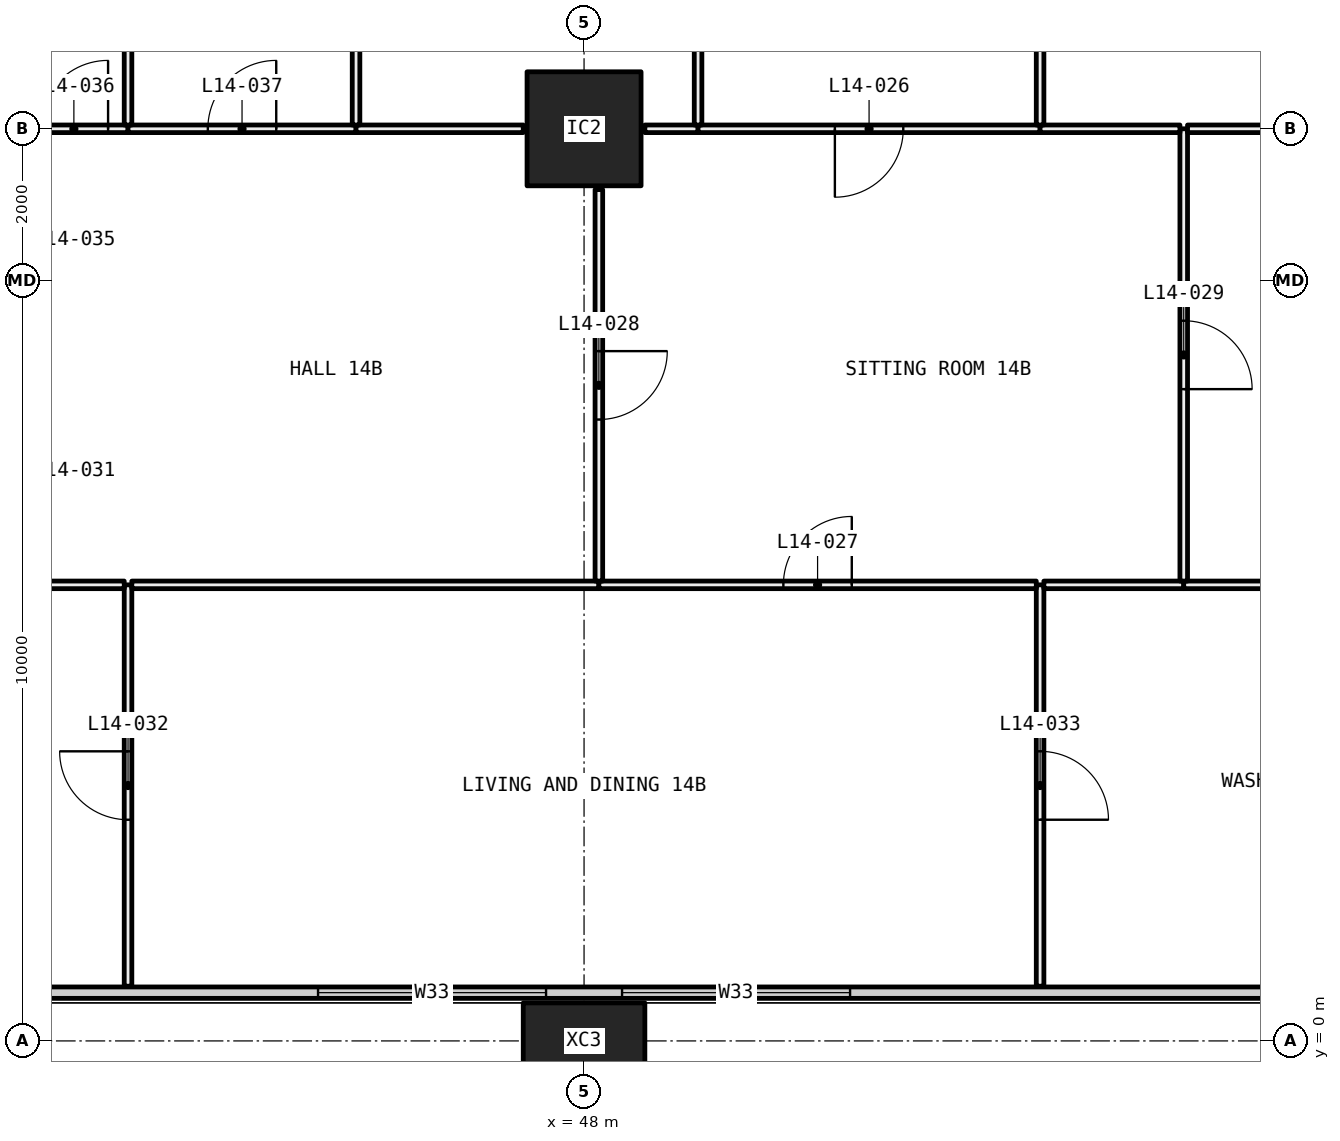
"""IFC4 building model, lengths in metres.
Left out: names, types, materials, properties, quantities, classifications, styles, units other than length and angle.
Written with IfcOpenShell. Run it as: python <this file> out.ifc"""

import sys

from ifc_helpers import new_model, si_unit, direction, frame, frame_2d, origin, origin_2d, place, context, subcontext, project, spatial, rectangle, hollow_rectangle, extrude, element, fill, save


model = new_model("IFC4")
c1 = context("Model", 3, precision=1e-05, world=origin(), true_north=direction((0.0, 1.0)))
c2 = subcontext(c1, "Body", "Model", "MODEL_VIEW")
j1 = project(units=[si_unit("LENGTHUNIT", "METRE"), si_unit("PLANEANGLEUNIT", "RADIAN")], contexts=[c1])
p1 = place(None, origin())
s1 = spatial("IfcSite", under=j1, at=p1, CompositionType="ELEMENT")
p2 = place(p1, origin())
s2 = spatial("IfcBuilding", under=s1, at=p2, CompositionType="ELEMENT")
p3 = place(p2, frame((0.0, 0.0, 61.05)))
s3 = spatial("IfcBuildingStorey", under=s2, at=p3, CompositionType="ELEMENT", Elevation=61.05)
p4 = place(p3, frame((48.0, 0.0, -0.4), z_axis=(0.0, 0.0, 1.0), x_axis=(1.0, 0.0, 0.0)))
e1 = element("IfcColumn", 1, at=p4, inside=s3, PredefinedType="COLUMN", context=c2, shape_type="SweptSolid", body=[
    extrude(hollow_rectangle(XDim=1.6, YDim=1.0, WallThickness=0.065, at=origin_2d()), origin(), (0.0, 0.0, 1.0), 3.45),
])
p5 = place(p3, frame((48.0, 12.0, 0.0), z_axis=(0.0, 0.0, 1.0), x_axis=(1.0, 0.0, 0.0)))
e2 = element("IfcColumn", 2, at=p5, inside=s3, PredefinedType="COLUMN", context=c2, shape_type="SweptSolid", body=[
    extrude(hollow_rectangle(XDim=1.5, YDim=1.5, WallThickness=0.065, at=origin_2d()), origin(), (0.0, 0.0, 1.0), 3.05),
])
p6 = place(p3, frame((6.56, 0.635, 0.0), z_axis=(0.0, 0.0, 1.0), x_axis=(1.0, 0.0, 0.0)))
e3 = element("IfcWall", 3, at=p6, inside=s3, PredefinedType="ELEMENTEDWALL", context=c2, shape_type="SweptSolid", body=[
    extrude(rectangle(XDim=58.88, YDim=0.15, at=frame_2d((29.44, 0.0))), origin(), (0.0, 0.0, 1.0), 3.05),
])
p7 = place(p6, frame((0.44, 0.0, 0.45)))
e4 = element("IfcOpeningElement", 4, at=p7, cuts=e3, PredefinedType="OPENING", context=c2, shape_type="SweptSolid", body=[
    extrude(rectangle(XDim=4.5, YDim=2.55, at=frame_2d((2.25, 1.275))), frame((0.0, 0.085, 0.0), z_axis=(0.0, -1.0, 0.0), x_axis=(1.0, 0.0, 0.0)), (0.0, 0.0, 1.0), 0.17),
])
p8 = place(p6, frame((5.94, 0.0, 0.45)))
e5 = element("IfcOpeningElement", 5, at=p8, cuts=e3, PredefinedType="OPENING", context=c2, shape_type="SweptSolid", body=[
    extrude(rectangle(XDim=3.0, YDim=2.55, at=frame_2d((1.5, 1.275))), frame((0.0, 0.085, 0.0), z_axis=(0.0, -1.0, 0.0), x_axis=(1.0, 0.0, 0.0)), (0.0, 0.0, 1.0), 0.17),
])
p9 = place(p6, frame((13.94, 0.0, 0.45)))
e6 = element("IfcOpeningElement", 6, at=p9, cuts=e3, PredefinedType="OPENING", context=c2, shape_type="SweptSolid", body=[
    extrude(rectangle(XDim=3.0, YDim=2.55, at=frame_2d((1.5, 1.275))), frame((0.0, 0.085, 0.0), z_axis=(0.0, -1.0, 0.0), x_axis=(1.0, 0.0, 0.0)), (0.0, 0.0, 1.0), 0.17),
])
p10 = place(p6, frame((17.94, 0.0, 0.45)))
e7 = element("IfcOpeningElement", 7, at=p10, cuts=e3, PredefinedType="OPENING", context=c2, shape_type="SweptSolid", body=[
    extrude(rectangle(XDim=3.0, YDim=2.55, at=frame_2d((1.5, 1.275))), frame((0.0, 0.085, 0.0), z_axis=(0.0, -1.0, 0.0), x_axis=(1.0, 0.0, 0.0)), (0.0, 0.0, 1.0), 0.17),
])
p11 = place(p6, frame((26.94, 0.0, 0.45)))
e8 = element("IfcOpeningElement", 8, at=p11, cuts=e3, PredefinedType="OPENING", context=c2, shape_type="SweptSolid", body=[
    extrude(rectangle(XDim=2.0, YDim=2.55, at=frame_2d((1.0, 1.275))), frame((0.0, 0.085, 0.0), z_axis=(0.0, -1.0, 0.0), x_axis=(1.0, 0.0, 0.0)), (0.0, 0.0, 1.0), 0.17),
])
p12 = place(p6, frame((29.94, 0.0, 0.45)))
e9 = element("IfcOpeningElement", 9, at=p12, cuts=e3, PredefinedType="OPENING", context=c2, shape_type="SweptSolid", body=[
    extrude(rectangle(XDim=3.0, YDim=2.55, at=frame_2d((1.5, 1.275))), frame((0.0, 0.085, 0.0), z_axis=(0.0, -1.0, 0.0), x_axis=(1.0, 0.0, 0.0)), (0.0, 0.0, 1.0), 0.17),
])
p13 = place(p6, frame((37.94, 0.0, 0.45)))
e10 = element("IfcOpeningElement", 10, at=p13, cuts=e3, PredefinedType="OPENING", context=c2, shape_type="SweptSolid", body=[
    extrude(rectangle(XDim=3.0, YDim=2.55, at=frame_2d((1.5, 1.275))), frame((0.0, 0.085, 0.0), z_axis=(0.0, -1.0, 0.0), x_axis=(1.0, 0.0, 0.0)), (0.0, 0.0, 1.0), 0.17),
])
p14 = place(p6, frame((41.94, 0.0, 0.45)))
e11 = element("IfcOpeningElement", 11, at=p14, cuts=e3, PredefinedType="OPENING", context=c2, shape_type="SweptSolid", body=[
    extrude(rectangle(XDim=3.0, YDim=2.55, at=frame_2d((1.5, 1.275))), frame((0.0, 0.085, 0.0), z_axis=(0.0, -1.0, 0.0), x_axis=(1.0, 0.0, 0.0)), (0.0, 0.0, 1.0), 0.17),
])
p15 = place(p6, frame((50.94, 0.0, 0.45)))
e12 = element("IfcOpeningElement", 12, at=p15, cuts=e3, PredefinedType="OPENING", context=c2, shape_type="SweptSolid", body=[
    extrude(rectangle(XDim=2.0, YDim=2.55, at=frame_2d((1.0, 1.275))), frame((0.0, 0.085, 0.0), z_axis=(0.0, -1.0, 0.0), x_axis=(1.0, 0.0, 0.0)), (0.0, 0.0, 1.0), 0.17),
])
p16 = place(p6, frame((53.94, 0.0, 0.45)))
e13 = element("IfcOpeningElement", 13, at=p16, cuts=e3, PredefinedType="OPENING", context=c2, shape_type="SweptSolid", body=[
    extrude(rectangle(XDim=4.5, YDim=2.55, at=frame_2d((2.25, 1.275))), frame((0.0, 0.085, 0.0), z_axis=(0.0, -1.0, 0.0), x_axis=(1.0, 0.0, 0.0)), (0.0, 0.0, 1.0), 0.17),
])
p17 = place(p3, frame((42.0, 0.72, 0.0), z_axis=(0.0, 0.0, 1.0), x_axis=(0.0, 1.0, 0.0)))
e14 = element("IfcWall", 14, at=p17, inside=s3, PredefinedType="PARTITIONING", context=c2, shape_type="SweptSolid", body=[
    extrude(rectangle(XDim=5.28, YDim=0.1, at=frame_2d((2.64, 0.0))), origin(), (0.0, 0.0, 1.0), 3.05),
])
p18 = place(p17, frame((2.19, 0.0, 0.0)))
e15 = element("IfcOpeningElement", 15, at=p18, cuts=e14, PredefinedType="OPENING", context=c2, shape_type="SweptSolid", body=[
    extrude(rectangle(XDim=0.9, YDim=2.1, at=frame_2d((0.45, 1.05))), frame((0.0, 0.06, 0.0), z_axis=(0.0, -1.0, 0.0), x_axis=(1.0, 0.0, 0.0)), (0.0, 0.0, 1.0), 0.12),
])
p19 = place(p3, frame((41.95, 6.0, 0.0), z_axis=(0.0, 0.0, 1.0), x_axis=(-1.0, 0.0, 0.0)))
e16 = element("IfcWall", 16, at=p19, inside=s3, PredefinedType="PARTITIONING", context=c2, shape_type="SweptSolid", body=[
    extrude(rectangle(XDim=1.375, YDim=0.1, at=frame_2d((0.688, 0.0))), origin(), (0.0, 0.0, 1.0), 3.05),
])
p20 = place(p3, frame((54.0, 0.72, 0.0), z_axis=(0.0, 0.0, 1.0), x_axis=(0.0, 1.0, 0.0)))
e17 = element("IfcWall", 17, at=p20, inside=s3, PredefinedType="PARTITIONING", context=c2, shape_type="SweptSolid", body=[
    extrude(rectangle(XDim=5.28, YDim=0.1, at=frame_2d((2.64, 0.0))), origin(), (0.0, 0.0, 1.0), 3.05),
])
p21 = place(p20, frame((2.19, 0.0, 0.0)))
e18 = element("IfcOpeningElement", 18, at=p21, cuts=e17, PredefinedType="OPENING", context=c2, shape_type="SweptSolid", body=[
    extrude(rectangle(XDim=0.9, YDim=2.1, at=frame_2d((0.45, 1.05))), frame((0.0, 0.06, 0.0), z_axis=(0.0, -1.0, 0.0), x_axis=(1.0, 0.0, 0.0)), (0.0, 0.0, 1.0), 0.12),
])
p22 = place(p3, frame((48.195, 6.0, 0.0), z_axis=(0.0, 0.0, 1.0), x_axis=(-1.0, 0.0, 0.0)))
e19 = element("IfcWall", 19, at=p22, inside=s3, PredefinedType="PARTITIONING", context=c2, shape_type="SweptSolid", body=[
    extrude(rectangle(XDim=6.145, YDim=0.1, at=frame_2d((3.073, 0.0))), origin(), (0.0, 0.0, 1.0), 2.45),
])
p23 = place(p3, frame((53.95, 6.0, 0.0), z_axis=(0.0, 0.0, 1.0), x_axis=(-1.0, 0.0, 0.0)))
e20 = element("IfcWall", 20, at=p23, inside=s3, PredefinedType="PARTITIONING", context=c2, shape_type="SweptSolid", body=[
    extrude(rectangle(XDim=5.755, YDim=0.1, at=frame_2d((2.877, 0.0))), origin(), (0.0, 0.0, 1.0), 3.05),
])
p24 = place(p23, frame((2.427, 0.0, 0.0)))
e21 = element("IfcOpeningElement", 21, at=p24, cuts=e20, PredefinedType="OPENING", context=c2, shape_type="SweptSolid", body=[
    extrude(rectangle(XDim=0.9, YDim=2.1, at=frame_2d((0.45, 1.05))), frame((0.0, 0.06, 0.0), z_axis=(0.0, -1.0, 0.0), x_axis=(1.0, 0.0, 0.0)), (0.0, 0.0, 1.0), 0.12),
])
p25 = place(p3, frame((55.89, 6.0, 0.0), z_axis=(0.0, 0.0, 1.0), x_axis=(-1.0, 0.0, 0.0)))
e22 = element("IfcWall", 22, at=p25, inside=s3, PredefinedType="PARTITIONING", context=c2, shape_type="SweptSolid", body=[
    extrude(rectangle(XDim=1.84, YDim=0.1, at=frame_2d((0.92, 0.0))), origin(), (0.0, 0.0, 1.0), 3.05),
])
p26 = place(p3, frame((59.95, 6.0, 0.0), z_axis=(0.0, 0.0, 1.0), x_axis=(-1.0, 0.0, 0.0)))
e23 = element("IfcWall", 23, at=p26, inside=s3, PredefinedType="PARTITIONING", context=c2, shape_type="SweptSolid", body=[
    extrude(rectangle(XDim=4.06, YDim=0.1, at=frame_2d((2.03, 0.0))), origin(), (0.0, 0.0, 1.0), 2.45),
])
p27 = place(p3, frame((48.195, 6.05, 0.0), z_axis=(0.0, 0.0, 1.0), x_axis=(0.0, 1.0, 0.0)))
e24 = element("IfcWall", 24, at=p27, inside=s3, PredefinedType="PARTITIONING", context=c2, shape_type="SweptSolid", body=[
    extrude(rectangle(XDim=5.15, YDim=0.1, at=frame_2d((2.575, 0.0))), origin(), (0.0, 0.0, 1.0), 3.05),
])
p28 = place(p27, frame((2.125, 0.0, 0.0)))
e25 = element("IfcOpeningElement", 25, at=p28, cuts=e24, PredefinedType="OPENING", context=c2, shape_type="SweptSolid", body=[
    extrude(rectangle(XDim=0.9, YDim=2.1, at=frame_2d((0.45, 1.05))), frame((0.0, 0.06, 0.0), z_axis=(0.0, -1.0, 0.0), x_axis=(1.0, 0.0, 0.0)), (0.0, 0.0, 1.0), 0.12),
])
p29 = place(p3, frame((42.0, 12.0, 0.0), z_axis=(0.0, 0.0, 1.0), x_axis=(-1.0, 0.0, 0.0)))
e26 = element("IfcWall", 26, at=p29, inside=s3, PredefinedType="PARTITIONING", context=c2, shape_type="SweptSolid", body=[
    extrude(rectangle(XDim=1.425, YDim=0.1, at=frame_2d((0.712, 0.0))), origin(), (0.0, 0.0, 1.0), 2.45),
])
p30 = place(p29, frame((0.262, 0.0, 0.0)))
e27 = element("IfcOpeningElement", 27, at=p30, cuts=e26, PredefinedType="OPENING", context=c2, shape_type="SweptSolid", body=[
    extrude(rectangle(XDim=0.9, YDim=2.1, at=frame_2d((0.45, 1.05))), frame((0.0, 0.06, 0.0), z_axis=(0.0, -1.0, 0.0), x_axis=(1.0, 0.0, 0.0)), (0.0, 0.0, 1.0), 0.12),
])
p31 = place(p3, frame((45.0, 12.0, 0.0), z_axis=(0.0, 0.0, 1.0), x_axis=(-1.0, 0.0, 0.0)))
e28 = element("IfcWall", 28, at=p31, inside=s3, PredefinedType="PARTITIONING", context=c2, shape_type="SweptSolid", body=[
    extrude(rectangle(XDim=3.0, YDim=0.1, at=frame_2d((1.5, 0.0))), origin(), (0.0, 0.0, 1.0), 2.45),
])
p32 = place(p31, frame((1.05, 0.0, 0.0)))
e29 = element("IfcOpeningElement", 29, at=p32, cuts=e28, PredefinedType="OPENING", context=c2, shape_type="SweptSolid", body=[
    extrude(rectangle(XDim=0.9, YDim=2.1, at=frame_2d((0.45, 1.05))), frame((0.0, 0.06, 0.0), z_axis=(0.0, -1.0, 0.0), x_axis=(1.0, 0.0, 0.0)), (0.0, 0.0, 1.0), 0.12),
])
p33 = place(p3, frame((47.2, 12.0, 0.0), z_axis=(0.0, 0.0, 1.0), x_axis=(-1.0, 0.0, 0.0)))
e30 = element("IfcWall", 30, at=p33, inside=s3, PredefinedType="PARTITIONING", context=c2, shape_type="SweptSolid", body=[
    extrude(rectangle(XDim=2.2, YDim=0.1, at=frame_2d((1.1, 0.0))), origin(), (0.0, 0.0, 1.0), 2.45),
])
p34 = place(p3, frame((55.89, 6.05, 0.0), z_axis=(0.0, 0.0, 1.0), x_axis=(0.0, 1.0, 0.0)))
e31 = element("IfcWall", 31, at=p34, inside=s3, PredefinedType="PARTITIONING", context=c2, shape_type="SweptSolid", body=[
    extrude(rectangle(XDim=5.95, YDim=0.1, at=frame_2d((2.975, 0.0))), origin(), (0.0, 0.0, 1.0), 2.45),
])
p35 = place(p34, frame((2.525, 0.0, 0.0)))
e32 = element("IfcOpeningElement", 32, at=p35, cuts=e31, PredefinedType="OPENING", context=c2, shape_type="SweptSolid", body=[
    extrude(rectangle(XDim=0.9, YDim=2.1, at=frame_2d((0.45, 1.05))), frame((0.0, 0.06, 0.0), z_axis=(0.0, -1.0, 0.0), x_axis=(1.0, 0.0, 0.0)), (0.0, 0.0, 1.0), 0.12),
])
p36 = place(p3, frame((49.5, 12.0, 0.0), z_axis=(0.0, 0.0, 1.0), x_axis=(-1.0, 0.0, 0.0)))
e33 = element("IfcWall", 33, at=p36, inside=s3, PredefinedType="PARTITIONING", context=c2, shape_type="SweptSolid", body=[
    extrude(rectangle(XDim=0.7, YDim=0.1, at=frame_2d((0.35, 0.0))), origin(), (0.0, 0.0, 1.0), 2.45),
])
p37 = place(p3, frame((54.0, 12.0, 0.0), z_axis=(0.0, 0.0, 1.0), x_axis=(-1.0, 0.0, 0.0)))
e34 = element("IfcWall", 34, at=p37, inside=s3, PredefinedType="PARTITIONING", context=c2, shape_type="SweptSolid", body=[
    extrude(rectangle(XDim=4.5, YDim=0.1, at=frame_2d((2.25, 0.0))), origin(), (0.0, 0.0, 1.0), 2.45),
])
p38 = place(p37, frame((1.8, 0.0, 0.0)))
e35 = element("IfcOpeningElement", 35, at=p38, cuts=e34, PredefinedType="OPENING", context=c2, shape_type="SweptSolid", body=[
    extrude(rectangle(XDim=0.9, YDim=2.1, at=frame_2d((0.45, 1.05))), frame((0.0, 0.06, 0.0), z_axis=(0.0, -1.0, 0.0), x_axis=(1.0, 0.0, 0.0)), (0.0, 0.0, 1.0), 0.12),
])
p39 = place(p3, frame((55.84, 12.0, 0.0), z_axis=(0.0, 0.0, 1.0), x_axis=(-1.0, 0.0, 0.0)))
e36 = element("IfcWall", 36, at=p39, inside=s3, PredefinedType="PARTITIONING", context=c2, shape_type="SweptSolid", body=[
    extrude(rectangle(XDim=1.84, YDim=0.1, at=frame_2d((0.92, 0.0))), origin(), (0.0, 0.0, 1.0), 2.45),
])
p40 = place(p3, frame((59.2, 12.0, 0.0), z_axis=(0.0, 0.0, 1.0), x_axis=(-1.0, 0.0, 0.0)))
e37 = element("IfcWall", 37, at=p40, inside=s3, PredefinedType="PARTITIONING", context=c2, shape_type="SweptSolid", body=[
    extrude(rectangle(XDim=3.26, YDim=0.1, at=frame_2d((1.63, 0.0))), origin(), (0.0, 0.0, 1.0), 2.45),
])
for number, where, z_axis, x_axis in (
    (38, (42.0, 12.05, 0.0), (0.0, 0.0, 1.0), (0.0, 1.0, 0.0)),
    (39, (45.0, 12.05, 0.0), (0.0, 0.0, 1.0), (0.0, 1.0, 0.0)),
):
    element("IfcWall", number, at=place(p3, frame(where, z_axis=z_axis, x_axis=x_axis)), inside=s3, PredefinedType="PARTITIONING", context=c2, shape_type="SweptSolid", body=[
        extrude(rectangle(XDim=5.95, YDim=0.1, at=frame_2d((2.975, 0.0))), origin(), (0.0, 0.0, 1.0), 2.45),
    ])
p41 = place(p3, frame((49.5, 12.05, 0.0), z_axis=(0.0, 0.0, 1.0), x_axis=(0.0, 1.0, 0.0)))
e40 = element("IfcWall", 40, at=p41, inside=s3, PredefinedType="PARTITIONING", context=c2, shape_type="SweptSolid", body=[
    extrude(rectangle(XDim=5.85, YDim=0.1, at=frame_2d((2.925, 0.0))), origin(), (0.0, 0.0, 1.0), 2.45),
])
p42 = place(p41, frame((2.475, 0.0, 0.0)))
e41 = element("IfcOpeningElement", 41, at=p42, cuts=e40, PredefinedType="OPENING", context=c2, shape_type="SweptSolid", body=[
    extrude(rectangle(XDim=0.9, YDim=2.1, at=frame_2d((0.45, 1.05))), frame((0.0, 0.06, 0.0), z_axis=(0.0, -1.0, 0.0), x_axis=(1.0, 0.0, 0.0)), (0.0, 0.0, 1.0), 0.12),
])
p43 = place(p3, frame((54.0, 12.05, 0.0), z_axis=(0.0, 0.0, 1.0), x_axis=(0.0, 1.0, 0.0)))
e42 = element("IfcWall", 42, at=p43, inside=s3, PredefinedType="PARTITIONING", context=c2, shape_type="SweptSolid", body=[
    extrude(rectangle(XDim=5.85, YDim=0.1, at=frame_2d((2.925, 0.0))), origin(), (0.0, 0.0, 1.0), 2.45),
])
p44 = place(p43, frame((2.475, 0.0, 0.0)))
e43 = element("IfcOpeningElement", 43, at=p44, cuts=e42, PredefinedType="OPENING", context=c2, shape_type="SweptSolid", body=[
    extrude(rectangle(XDim=0.9, YDim=2.1, at=frame_2d((0.45, 1.05))), frame((0.0, 0.06, 0.0), z_axis=(0.0, -1.0, 0.0), x_axis=(1.0, 0.0, 0.0)), (0.0, 0.0, 1.0), 0.12),
])
p45 = place(p13, origin())
e44 = element("IfcWindow", 44, at=p45, inside=s3, PartitioningType="SINGLE_PANEL", PredefinedType="WINDOW", context=c2, shape_type="SweptSolid", body=[
    extrude(rectangle(XDim=3.0, YDim=2.55, at=frame_2d((1.5, 1.275))), frame((0.0, 0.03, 0.0), z_axis=(0.0, -1.0, 0.0), x_axis=(1.0, 0.0, 0.0)), (0.0, 0.0, 1.0), 0.06),
])
fill(e10, e44)
p46 = place(p14, origin())
e45 = element("IfcWindow", 45, at=p46, inside=s3, PartitioningType="SINGLE_PANEL", PredefinedType="WINDOW", context=c2, shape_type="SweptSolid", body=[
    extrude(rectangle(XDim=3.0, YDim=2.55, at=frame_2d((1.5, 1.275))), frame((0.0, 0.03, 0.0), z_axis=(0.0, -1.0, 0.0), x_axis=(1.0, 0.0, 0.0)), (0.0, 0.0, 1.0), 0.06),
])
fill(e11, e45)
p47 = place(p38, origin())
e46 = element("IfcDoor", 46, at=p47, inside=s3, OperationType="SINGLE_SWING_LEFT", PredefinedType="DOOR", context=c2, shape_type="SweptSolid", body=[
    extrude(rectangle(XDim=0.9, YDim=2.1, at=frame_2d((0.45, 1.05))), frame((0.0, 0.025, 0.0), z_axis=(0.0, -1.0, 0.0), x_axis=(1.0, 0.0, 0.0)), (0.0, 0.0, 1.0), 0.05),
])
fill(e35, e46)
p48 = place(p24, frame((0.9, 0.0, 0.0), x_axis=(-1.0, 0.0, 0.0)))
e47 = element("IfcDoor", 47, at=p48, inside=s3, OperationType="SINGLE_SWING_LEFT", PredefinedType="DOOR", context=c2, shape_type="SweptSolid", body=[
    extrude(rectangle(XDim=0.9, YDim=2.1, at=frame_2d((0.45, 1.05))), frame((0.0, 0.025, 0.0), z_axis=(0.0, -1.0, 0.0), x_axis=(1.0, 0.0, 0.0)), (0.0, 0.0, 1.0), 0.05),
])
fill(e21, e47)
p49 = place(p28, frame((0.9, 0.0, 0.0), x_axis=(-1.0, 0.0, 0.0)))
e48 = element("IfcDoor", 48, at=p49, inside=s3, OperationType="SINGLE_SWING_RIGHT", PredefinedType="DOOR", context=c2, shape_type="SweptSolid", body=[
    extrude(rectangle(XDim=0.9, YDim=2.1, at=frame_2d((0.45, 1.05))), frame((0.0, 0.025, 0.0), z_axis=(0.0, -1.0, 0.0), x_axis=(1.0, 0.0, 0.0)), (0.0, 0.0, 1.0), 0.05),
])
fill(e25, e48)
p50 = place(p35, frame((0.9, 0.0, 0.0), x_axis=(-1.0, 0.0, 0.0)))
e49 = element("IfcDoor", 49, at=p50, inside=s3, OperationType="SINGLE_SWING_LEFT", PredefinedType="DOOR", context=c2, shape_type="SweptSolid", body=[
    extrude(rectangle(XDim=0.9, YDim=2.1, at=frame_2d((0.45, 1.05))), frame((0.0, 0.025, 0.0), z_axis=(0.0, -1.0, 0.0), x_axis=(1.0, 0.0, 0.0)), (0.0, 0.0, 1.0), 0.05),
])
fill(e32, e49)
p51 = place(p18, origin())
e50 = element("IfcDoor", 50, at=p51, inside=s3, OperationType="SINGLE_SWING_LEFT", PredefinedType="DOOR", context=c2, shape_type="SweptSolid", body=[
    extrude(rectangle(XDim=0.9, YDim=2.1, at=frame_2d((0.45, 1.05))), frame((0.0, 0.025, 0.0), z_axis=(0.0, -1.0, 0.0), x_axis=(1.0, 0.0, 0.0)), (0.0, 0.0, 1.0), 0.05),
])
fill(e15, e50)
p52 = place(p21, frame((0.9, 0.0, 0.0), x_axis=(-1.0, 0.0, 0.0)))
e51 = element("IfcDoor", 51, at=p52, inside=s3, OperationType="SINGLE_SWING_LEFT", PredefinedType="DOOR", context=c2, shape_type="SweptSolid", body=[
    extrude(rectangle(XDim=0.9, YDim=2.1, at=frame_2d((0.45, 1.05))), frame((0.0, 0.025, 0.0), z_axis=(0.0, -1.0, 0.0), x_axis=(1.0, 0.0, 0.0)), (0.0, 0.0, 1.0), 0.05),
])
fill(e18, e51)
p53 = place(p30, frame((0.9, 0.0, 0.0), x_axis=(-1.0, 0.0, 0.0)))
e52 = element("IfcDoor", 52, at=p53, inside=s3, OperationType="SINGLE_SWING_LEFT", PredefinedType="DOOR", context=c2, shape_type="SweptSolid", body=[
    extrude(rectangle(XDim=0.9, YDim=2.1, at=frame_2d((0.45, 1.05))), frame((0.0, 0.025, 0.0), z_axis=(0.0, -1.0, 0.0), x_axis=(1.0, 0.0, 0.0)), (0.0, 0.0, 1.0), 0.05),
])
fill(e27, e52)
p54 = place(p32, frame((0.9, 0.0, 0.0), x_axis=(-1.0, 0.0, 0.0)))
e53 = element("IfcDoor", 53, at=p54, inside=s3, OperationType="SINGLE_SWING_LEFT", PredefinedType="DOOR", context=c2, shape_type="SweptSolid", body=[
    extrude(rectangle(XDim=0.9, YDim=2.1, at=frame_2d((0.45, 1.05))), frame((0.0, 0.025, 0.0), z_axis=(0.0, -1.0, 0.0), x_axis=(1.0, 0.0, 0.0)), (0.0, 0.0, 1.0), 0.05),
])
fill(e29, e53)
save(model, sys.argv[1])
